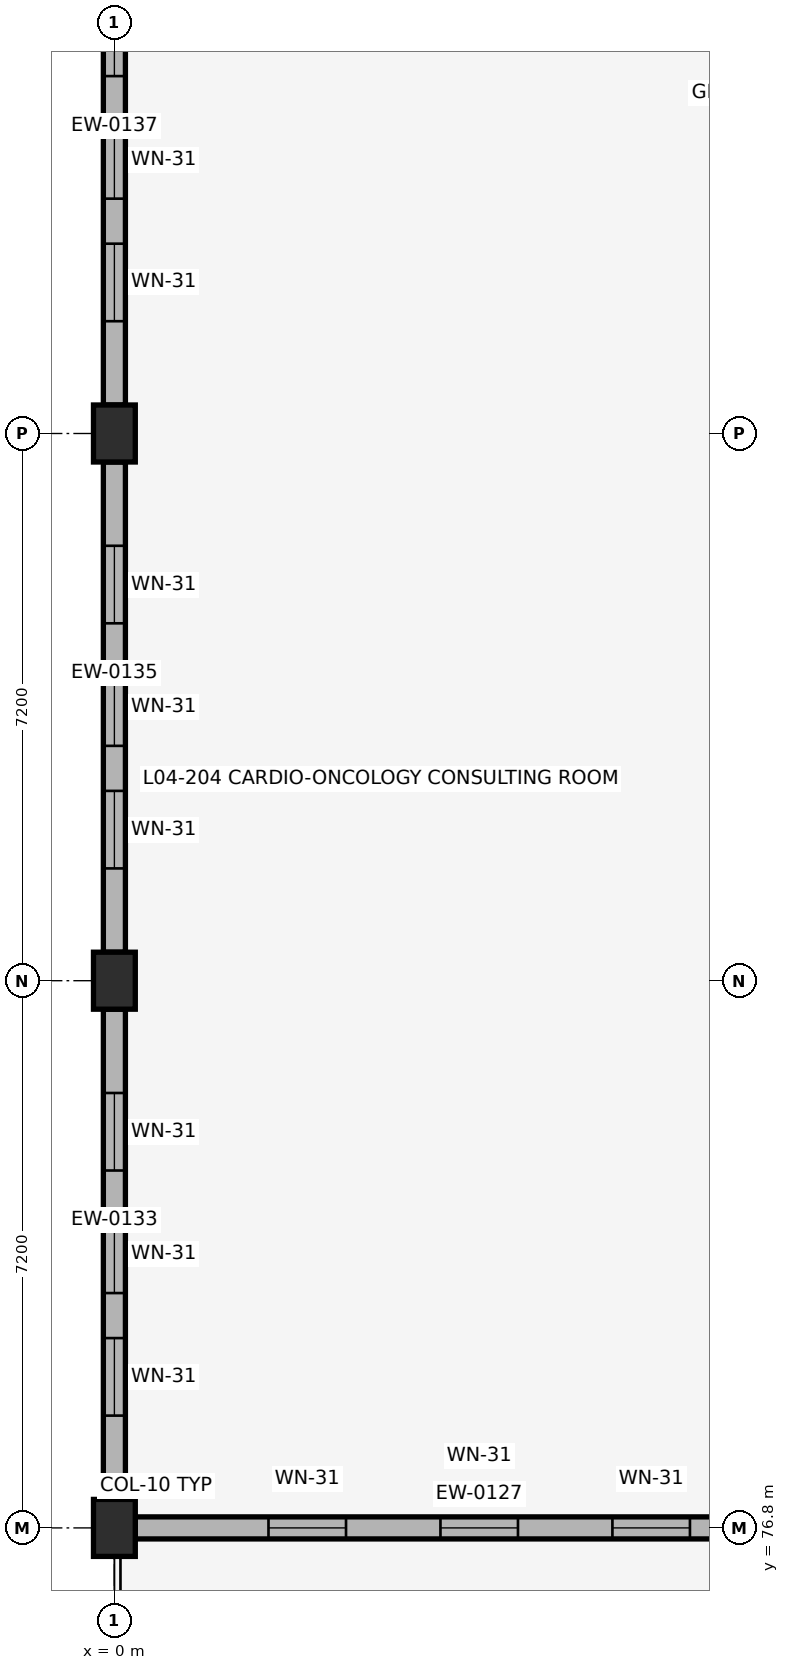
"""IFC4 building model, lengths in metres.
Left out: names, types, materials, properties, quantities, classifications, styles, units other than length and angle.
Written with IfcOpenShell. Run it as: python <this file> out.ifc"""

import sys

from ifc_helpers import new_model, si_unit, direction, frame, frame_2d, origin, origin_2d, place, context, subcontext, project, spatial, rectangle, extrude, element, fill, save


model = new_model("IFC4")
c1 = context("Model", 3, precision=1e-05, world=origin(), true_north=direction((0.0, 1.0)))
c2 = subcontext(c1, "Body", "Model", "MODEL_VIEW")
j1 = project(units=[si_unit("LENGTHUNIT", "METRE"), si_unit("PLANEANGLEUNIT", "RADIAN")], contexts=[c1])
p1 = place(None, origin())
s1 = spatial("IfcSite", under=j1, at=p1, CompositionType="ELEMENT")
p2 = place(p1, origin())
s2 = spatial("IfcBuilding", under=s1, at=p2, CompositionType="ELEMENT")
p3 = place(p2, frame((0.0, 0.0, 16.66)))
s3 = spatial("IfcBuildingStorey", under=s2, at=p3, CompositionType="ELEMENT", Elevation=16.66)
for number, where, z_axis, x_axis in (
    (1, (0.0, 76.8, 0.0), (0.0, 0.0, 1.0), (1.0, 0.0, 0.0)),
    (2, (0.0, 84.0, 0.0), (0.0, 0.0, 1.0), (1.0, 0.0, 0.0)),
    (3, (0.0, 91.2, 0.0), (0.0, 0.0, 1.0), (1.0, 0.0, 0.0)),
):
    element("IfcColumn", number, at=place(p3, frame(where, z_axis=z_axis, x_axis=x_axis)), inside=s3, PredefinedType="COLUMN", context=c2, shape_type="SweptSolid", body=[
        extrude(rectangle(XDim=0.55, YDim=0.75, at=origin_2d()), origin(), (0.0, 0.0, 1.0), 4.08),
    ])
p4 = place(p3, frame((0.275, 76.8, 0.0), z_axis=(0.0, 0.0, 1.0), x_axis=(1.0, 0.0, 0.0)))
e4 = element("IfcWall", 4, at=p4, inside=s3, PredefinedType="SOLIDWALL", context=c2, shape_type="SweptSolid", body=[
    extrude(rectangle(XDim=9.05, YDim=0.29, at=frame_2d((4.525, 0.0))), origin(), (0.0, 0.0, 1.0), 3.08),
])
p5 = place(p4, frame((1.752, 0.0, 0.88)))
e5 = element("IfcOpeningElement", 5, at=p5, cuts=e4, PredefinedType="OPENING", context=c2, shape_type="SweptSolid", body=[
    extrude(rectangle(XDim=1.02, YDim=1.88, at=frame_2d((0.51, 0.94))), frame((0.0, 0.155, 0.0), z_axis=(0.0, -1.0, 0.0), x_axis=(1.0, 0.0, 0.0)), (0.0, 0.0, 1.0), 0.31),
])
p6 = place(p4, frame((4.015, 0.0, 0.88)))
e6 = element("IfcOpeningElement", 6, at=p6, cuts=e4, PredefinedType="OPENING", context=c2, shape_type="SweptSolid", body=[
    extrude(rectangle(XDim=1.02, YDim=1.88, at=frame_2d((0.51, 0.94))), frame((0.0, 0.155, 0.0), z_axis=(0.0, -1.0, 0.0), x_axis=(1.0, 0.0, 0.0)), (0.0, 0.0, 1.0), 0.31),
])
p7 = place(p4, frame((6.278, 0.0, 0.88)))
e7 = element("IfcOpeningElement", 7, at=p7, cuts=e4, PredefinedType="OPENING", context=c2, shape_type="SweptSolid", body=[
    extrude(rectangle(XDim=1.02, YDim=1.88, at=frame_2d((0.51, 0.94))), frame((0.0, 0.155, 0.0), z_axis=(0.0, -1.0, 0.0), x_axis=(1.0, 0.0, 0.0)), (0.0, 0.0, 1.0), 0.31),
])
p8 = place(p3, frame((0.0, 83.625, 0.0), z_axis=(0.0, 0.0, 1.0), x_axis=(0.0, -1.0, 0.0)))
e8 = element("IfcWall", 8, at=p8, inside=s3, PredefinedType="SOLIDWALL", context=c2, shape_type="SweptSolid", body=[
    extrude(rectangle(XDim=6.45, YDim=0.29, at=frame_2d((3.225, 0.0))), origin(), (0.0, 0.0, 1.0), 3.08),
])
p9 = place(p8, frame((1.103, 0.0, 0.88)))
e9 = element("IfcOpeningElement", 9, at=p9, cuts=e8, PredefinedType="OPENING", context=c2, shape_type="SweptSolid", body=[
    extrude(rectangle(XDim=1.02, YDim=1.88, at=frame_2d((0.51, 0.94))), frame((0.0, 0.155, 0.0), z_axis=(0.0, -1.0, 0.0), x_axis=(1.0, 0.0, 0.0)), (0.0, 0.0, 1.0), 0.31),
])
p10 = place(p8, frame((2.715, 0.0, 0.88)))
e10 = element("IfcOpeningElement", 10, at=p10, cuts=e8, PredefinedType="OPENING", context=c2, shape_type="SweptSolid", body=[
    extrude(rectangle(XDim=1.02, YDim=1.88, at=frame_2d((0.51, 0.94))), frame((0.0, 0.155, 0.0), z_axis=(0.0, -1.0, 0.0), x_axis=(1.0, 0.0, 0.0)), (0.0, 0.0, 1.0), 0.31),
])
p11 = place(p8, frame((4.327, 0.0, 0.88)))
e11 = element("IfcOpeningElement", 11, at=p11, cuts=e8, PredefinedType="OPENING", context=c2, shape_type="SweptSolid", body=[
    extrude(rectangle(XDim=1.02, YDim=1.88, at=frame_2d((0.51, 0.94))), frame((0.0, 0.155, 0.0), z_axis=(0.0, -1.0, 0.0), x_axis=(1.0, 0.0, 0.0)), (0.0, 0.0, 1.0), 0.31),
])
p12 = place(p3, frame((0.0, 90.825, 0.0), z_axis=(0.0, 0.0, 1.0), x_axis=(0.0, -1.0, 0.0)))
e12 = element("IfcWall", 12, at=p12, inside=s3, PredefinedType="SOLIDWALL", context=c2, shape_type="SweptSolid", body=[
    extrude(rectangle(XDim=6.45, YDim=0.29, at=frame_2d((3.225, 0.0))), origin(), (0.0, 0.0, 1.0), 3.08),
])
p13 = place(p12, frame((1.103, 0.0, 0.88)))
e13 = element("IfcOpeningElement", 13, at=p13, cuts=e12, PredefinedType="OPENING", context=c2, shape_type="SweptSolid", body=[
    extrude(rectangle(XDim=1.02, YDim=1.88, at=frame_2d((0.51, 0.94))), frame((0.0, 0.155, 0.0), z_axis=(0.0, -1.0, 0.0), x_axis=(1.0, 0.0, 0.0)), (0.0, 0.0, 1.0), 0.31),
])
p14 = place(p12, frame((2.715, 0.0, 0.88)))
e14 = element("IfcOpeningElement", 14, at=p14, cuts=e12, PredefinedType="OPENING", context=c2, shape_type="SweptSolid", body=[
    extrude(rectangle(XDim=1.02, YDim=1.88, at=frame_2d((0.51, 0.94))), frame((0.0, 0.155, 0.0), z_axis=(0.0, -1.0, 0.0), x_axis=(1.0, 0.0, 0.0)), (0.0, 0.0, 1.0), 0.31),
])
p15 = place(p12, frame((4.327, 0.0, 0.88)))
e15 = element("IfcOpeningElement", 15, at=p15, cuts=e12, PredefinedType="OPENING", context=c2, shape_type="SweptSolid", body=[
    extrude(rectangle(XDim=1.02, YDim=1.88, at=frame_2d((0.51, 0.94))), frame((0.0, 0.155, 0.0), z_axis=(0.0, -1.0, 0.0), x_axis=(1.0, 0.0, 0.0)), (0.0, 0.0, 1.0), 0.31),
])
p16 = place(p3, frame((0.0, 98.025, 0.0), z_axis=(0.0, 0.0, 1.0), x_axis=(0.0, -1.0, 0.0)))
e16 = element("IfcWall", 16, at=p16, inside=s3, PredefinedType="SOLIDWALL", context=c2, shape_type="SweptSolid", body=[
    extrude(rectangle(XDim=6.45, YDim=0.29, at=frame_2d((3.225, 0.0))), origin(), (0.0, 0.0, 1.0), 3.08),
])
p17 = place(p16, frame((1.103, 0.0, 0.88)))
e17 = element("IfcOpeningElement", 17, at=p17, cuts=e16, PredefinedType="OPENING", context=c2, shape_type="SweptSolid", body=[
    extrude(rectangle(XDim=1.02, YDim=1.88, at=frame_2d((0.51, 0.94))), frame((0.0, 0.155, 0.0), z_axis=(0.0, -1.0, 0.0), x_axis=(1.0, 0.0, 0.0)), (0.0, 0.0, 1.0), 0.31),
])
p18 = place(p16, frame((2.715, 0.0, 0.88)))
e18 = element("IfcOpeningElement", 18, at=p18, cuts=e16, PredefinedType="OPENING", context=c2, shape_type="SweptSolid", body=[
    extrude(rectangle(XDim=1.02, YDim=1.88, at=frame_2d((0.51, 0.94))), frame((0.0, 0.155, 0.0), z_axis=(0.0, -1.0, 0.0), x_axis=(1.0, 0.0, 0.0)), (0.0, 0.0, 1.0), 0.31),
])
p19 = place(p16, frame((4.327, 0.0, 0.88)))
e19 = element("IfcOpeningElement", 19, at=p19, cuts=e16, PredefinedType="OPENING", context=c2, shape_type="SweptSolid", body=[
    extrude(rectangle(XDim=1.02, YDim=1.88, at=frame_2d((0.51, 0.94))), frame((0.0, 0.155, 0.0), z_axis=(0.0, -1.0, 0.0), x_axis=(1.0, 0.0, 0.0)), (0.0, 0.0, 1.0), 0.31),
])
p20 = place(p5, origin())
e20 = element("IfcWindow", 20, at=p20, inside=s3, PartitioningType="SINGLE_PANEL", PredefinedType="WINDOW", context=c2, shape_type="SweptSolid", body=[
    extrude(rectangle(XDim=1.02, YDim=1.88, at=frame_2d((0.51, 0.94))), frame((0.0, 0.03, 0.0), z_axis=(0.0, -1.0, 0.0), x_axis=(1.0, 0.0, 0.0)), (0.0, 0.0, 1.0), 0.06),
])
fill(e5, e20)
p21 = place(p6, origin())
e21 = element("IfcWindow", 21, at=p21, inside=s3, PartitioningType="SINGLE_PANEL", PredefinedType="WINDOW", context=c2, shape_type="SweptSolid", body=[
    extrude(rectangle(XDim=1.02, YDim=1.88, at=frame_2d((0.51, 0.94))), frame((0.0, 0.03, 0.0), z_axis=(0.0, -1.0, 0.0), x_axis=(1.0, 0.0, 0.0)), (0.0, 0.0, 1.0), 0.06),
])
fill(e6, e21)
p22 = place(p7, origin())
e22 = element("IfcWindow", 22, at=p22, inside=s3, PartitioningType="SINGLE_PANEL", PredefinedType="WINDOW", context=c2, shape_type="SweptSolid", body=[
    extrude(rectangle(XDim=1.02, YDim=1.88, at=frame_2d((0.51, 0.94))), frame((0.0, 0.03, 0.0), z_axis=(0.0, -1.0, 0.0), x_axis=(1.0, 0.0, 0.0)), (0.0, 0.0, 1.0), 0.06),
])
fill(e7, e22)
p23 = place(p9, origin())
e23 = element("IfcWindow", 23, at=p23, inside=s3, PartitioningType="SINGLE_PANEL", PredefinedType="WINDOW", context=c2, shape_type="SweptSolid", body=[
    extrude(rectangle(XDim=1.02, YDim=1.88, at=frame_2d((0.51, 0.94))), frame((0.0, 0.03, 0.0), z_axis=(0.0, -1.0, 0.0), x_axis=(1.0, 0.0, 0.0)), (0.0, 0.0, 1.0), 0.06),
])
fill(e9, e23)
p24 = place(p10, origin())
e24 = element("IfcWindow", 24, at=p24, inside=s3, PartitioningType="SINGLE_PANEL", PredefinedType="WINDOW", context=c2, shape_type="SweptSolid", body=[
    extrude(rectangle(XDim=1.02, YDim=1.88, at=frame_2d((0.51, 0.94))), frame((0.0, 0.03, 0.0), z_axis=(0.0, -1.0, 0.0), x_axis=(1.0, 0.0, 0.0)), (0.0, 0.0, 1.0), 0.06),
])
fill(e10, e24)
p25 = place(p11, origin())
e25 = element("IfcWindow", 25, at=p25, inside=s3, PartitioningType="SINGLE_PANEL", PredefinedType="WINDOW", context=c2, shape_type="SweptSolid", body=[
    extrude(rectangle(XDim=1.02, YDim=1.88, at=frame_2d((0.51, 0.94))), frame((0.0, 0.03, 0.0), z_axis=(0.0, -1.0, 0.0), x_axis=(1.0, 0.0, 0.0)), (0.0, 0.0, 1.0), 0.06),
])
fill(e11, e25)
p26 = place(p13, origin())
e26 = element("IfcWindow", 26, at=p26, inside=s3, PartitioningType="SINGLE_PANEL", PredefinedType="WINDOW", context=c2, shape_type="SweptSolid", body=[
    extrude(rectangle(XDim=1.02, YDim=1.88, at=frame_2d((0.51, 0.94))), frame((0.0, 0.03, 0.0), z_axis=(0.0, -1.0, 0.0), x_axis=(1.0, 0.0, 0.0)), (0.0, 0.0, 1.0), 0.06),
])
fill(e13, e26)
p27 = place(p14, origin())
e27 = element("IfcWindow", 27, at=p27, inside=s3, PartitioningType="SINGLE_PANEL", PredefinedType="WINDOW", context=c2, shape_type="SweptSolid", body=[
    extrude(rectangle(XDim=1.02, YDim=1.88, at=frame_2d((0.51, 0.94))), frame((0.0, 0.03, 0.0), z_axis=(0.0, -1.0, 0.0), x_axis=(1.0, 0.0, 0.0)), (0.0, 0.0, 1.0), 0.06),
])
fill(e14, e27)
p28 = place(p15, origin())
e28 = element("IfcWindow", 28, at=p28, inside=s3, PartitioningType="SINGLE_PANEL", PredefinedType="WINDOW", context=c2, shape_type="SweptSolid", body=[
    extrude(rectangle(XDim=1.02, YDim=1.88, at=frame_2d((0.51, 0.94))), frame((0.0, 0.03, 0.0), z_axis=(0.0, -1.0, 0.0), x_axis=(1.0, 0.0, 0.0)), (0.0, 0.0, 1.0), 0.06),
])
fill(e15, e28)
p29 = place(p17, origin())
e29 = element("IfcWindow", 29, at=p29, inside=s3, PartitioningType="SINGLE_PANEL", PredefinedType="WINDOW", context=c2, shape_type="SweptSolid", body=[
    extrude(rectangle(XDim=1.02, YDim=1.88, at=frame_2d((0.51, 0.94))), frame((0.0, 0.03, 0.0), z_axis=(0.0, -1.0, 0.0), x_axis=(1.0, 0.0, 0.0)), (0.0, 0.0, 1.0), 0.06),
])
fill(e17, e29)
p30 = place(p18, origin())
e30 = element("IfcWindow", 30, at=p30, inside=s3, PartitioningType="SINGLE_PANEL", PredefinedType="WINDOW", context=c2, shape_type="SweptSolid", body=[
    extrude(rectangle(XDim=1.02, YDim=1.88, at=frame_2d((0.51, 0.94))), frame((0.0, 0.03, 0.0), z_axis=(0.0, -1.0, 0.0), x_axis=(1.0, 0.0, 0.0)), (0.0, 0.0, 1.0), 0.06),
])
fill(e18, e30)
p31 = place(p19, origin())
e31 = element("IfcWindow", 31, at=p31, inside=s3, PartitioningType="SINGLE_PANEL", PredefinedType="WINDOW", context=c2, shape_type="SweptSolid", body=[
    extrude(rectangle(XDim=1.02, YDim=1.88, at=frame_2d((0.51, 0.94))), frame((0.0, 0.03, 0.0), z_axis=(0.0, -1.0, 0.0), x_axis=(1.0, 0.0, 0.0)), (0.0, 0.0, 1.0), 0.06),
])
fill(e19, e31)
save(model, sys.argv[1])
